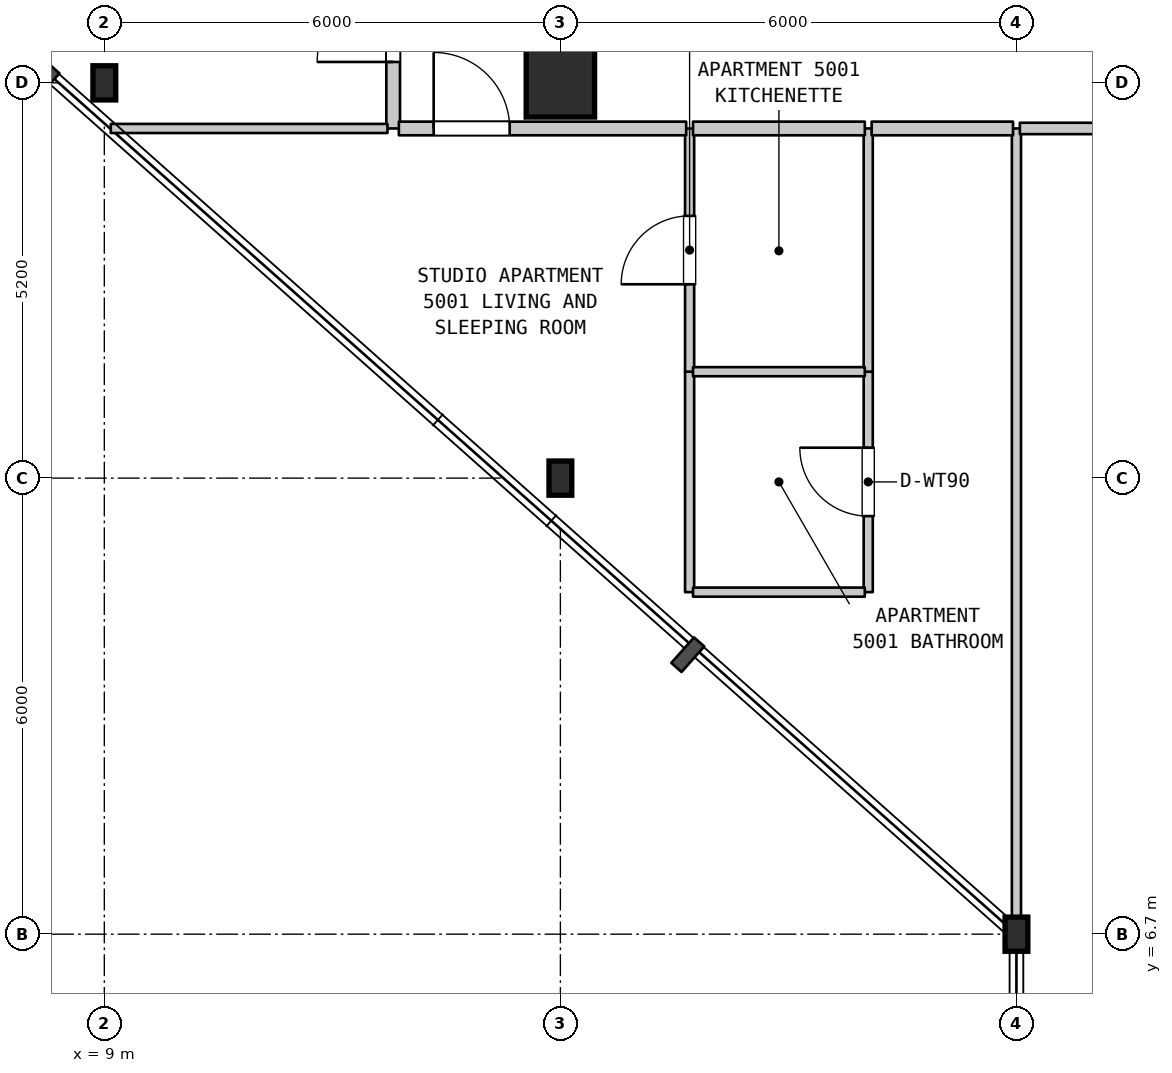
"""IFC4 building model, lengths in metres.
Left out: names, types, materials, properties, quantities, classifications, styles, units other than length and angle.
Written with IfcOpenShell. Run it as: python <this file> out.ifc"""

import sys

from ifc_helpers import new_model, si_unit, direction, frame, frame_2d, origin, origin_2d, place, context, subcontext, project, spatial, rectangle, i_section, extrude, element, fill, save


model = new_model("IFC4")
c1 = context("Model", 3, precision=1e-05, world=origin(), true_north=direction((0.0, 1.0)))
c2 = subcontext(c1, "Body", "Model", "MODEL_VIEW")
j1 = project(units=[si_unit("LENGTHUNIT", "METRE"), si_unit("PLANEANGLEUNIT", "RADIAN")], contexts=[c1])
p1 = place(None, origin())
s1 = spatial("IfcSite", under=j1, at=p1, CompositionType="ELEMENT")
p2 = place(p1, origin())
s2 = spatial("IfcBuilding", under=s1, at=p2, CompositionType="ELEMENT")
p3 = place(p2, frame((0.0, 0.0, 203.2)))
s3 = spatial("IfcBuildingStorey", under=s2, at=p3, CompositionType="ELEMENT", Elevation=203.2)
for number, where, z_axis, x_axis in (
    (1, (9.0, 17.9, 0.0), (0.0, 0.0, 1.0), (1.0, 0.0, 0.0)),
    (2, (15.0, 12.7, 0.0), (0.0, 0.0, 1.0), (1.0, 0.0, 0.0)),
):
    element("IfcColumn", number, at=place(p3, frame(where, z_axis=z_axis, x_axis=x_axis)), inside=s3, PredefinedType="COLUMN", context=c2, shape_type="SweptSolid", body=[
        extrude(i_section(OverallWidth=0.3, OverallDepth=0.45, WebThickness=0.014, FlangeThickness=0.026, FilletRadius=0.027, at=origin_2d()), origin(), (0.0, 0.0, 1.0), 3.7),
    ])
p4 = place(p3, frame((15.0, 17.9, 0.0), z_axis=(0.0, 0.0, 1.0), x_axis=(1.0, 0.0, 0.0)))
e3 = element("IfcColumn", 3, at=p4, inside=s3, PredefinedType="COLUMN", context=c2, shape_type="SweptSolid", body=[
    extrude(rectangle(XDim=0.9, YDim=0.9, at=origin_2d()), origin(), (0.0, 0.0, 1.0), 3.7),
])
p5 = place(p3, frame((21.0, 6.7, 0.0), z_axis=(0.0, 0.0, 1.0), x_axis=(1.0, 0.0, 0.0)))
e4 = element("IfcColumn", 4, at=p5, inside=s3, PredefinedType="COLUMN", context=c2, shape_type="SweptSolid", body=[
    extrude(i_section(OverallWidth=0.3, OverallDepth=0.45, WebThickness=0.014, FlangeThickness=0.026, FilletRadius=0.027, at=origin_2d()), origin(), (0.0, 0.0, 1.0), 3.7),
])
p6 = place(p3, frame((12.8, 17.3, 0.0), z_axis=(0.0, 0.0, 1.0), x_axis=(0.0, 1.0, 0.0)))
e5 = element("IfcWall", 5, at=p6, inside=s3, PredefinedType="STANDARD", context=c2, shape_type="SweptSolid", body=[
    extrude(rectangle(XDim=2.75, YDim=0.18, at=frame_2d((1.375, 0.0))), origin(), (0.0, 0.0, 1.0), 3.39),
])
p7 = place(p6, frame((0.875, 0.0, 0.0)))
e6 = element("IfcOpeningElement", 6, at=p7, cuts=e5, PredefinedType="OPENING", context=c2, shape_type="SweptSolid", body=[
    extrude(rectangle(XDim=1.0, YDim=2.15, at=frame_2d((0.5, 1.075))), frame((0.0, 0.1, 0.0), z_axis=(0.0, -1.0, 0.0), x_axis=(1.0, 0.0, 0.0)), (0.0, 0.0, 1.0), 0.2),
])
p8 = place(p3, frame((16.7, 11.2, 0.0), z_axis=(0.0, 0.0, 1.0), x_axis=(0.0, 1.0, 0.0)))
e7 = element("IfcWall", 7, at=p8, inside=s3, PredefinedType="PARTITIONING", context=c2, shape_type="SweptSolid", body=[
    extrude(rectangle(XDim=2.9, YDim=0.12, at=frame_2d((1.45, 0.0))), origin(), (0.0, 0.0, 1.0), 3.39),
])
p9 = place(p3, frame((16.7, 14.1, 0.0), z_axis=(0.0, 0.0, 1.0), x_axis=(0.0, 1.0, 0.0)))
e8 = element("IfcWall", 8, at=p9, inside=s3, PredefinedType="PARTITIONING", context=c2, shape_type="SweptSolid", body=[
    extrude(rectangle(XDim=3.2, YDim=0.12, at=frame_2d((1.6, 0.0))), origin(), (0.0, 0.0, 1.0), 3.39),
])
p10 = place(p9, frame((1.15, 0.0, 0.0)))
e9 = element("IfcOpeningElement", 9, at=p10, cuts=e8, PredefinedType="OPENING", context=c2, shape_type="SweptSolid", body=[
    extrude(rectangle(XDim=0.9, YDim=2.15, at=frame_2d((0.45, 1.075))), frame((0.0, 0.07, 0.0), z_axis=(0.0, -1.0, 0.0), x_axis=(1.0, 0.0, 0.0)), (0.0, 0.0, 1.0), 0.14),
])
p11 = place(p3, frame((19.05, 11.2, 0.0), z_axis=(0.0, 0.0, 1.0), x_axis=(0.0, 1.0, 0.0)))
e10 = element("IfcWall", 10, at=p11, inside=s3, PredefinedType="PARTITIONING", context=c2, shape_type="SweptSolid", body=[
    extrude(rectangle(XDim=2.9, YDim=0.12, at=frame_2d((1.45, 0.0))), origin(), (0.0, 0.0, 1.0), 3.39),
])
p12 = place(p11, frame((1.0, 0.0, 0.0)))
e11 = element("IfcOpeningElement", 11, at=p12, cuts=e10, PredefinedType="OPENING", context=c2, shape_type="SweptSolid", body=[
    extrude(rectangle(XDim=0.9, YDim=2.1, at=frame_2d((0.45, 1.05))), frame((0.0, 0.07, 0.0), z_axis=(0.0, -1.0, 0.0), x_axis=(1.0, 0.0, 0.0)), (0.0, 0.0, 1.0), 0.14),
])
p13 = place(p3, frame((19.05, 14.1, 0.0), z_axis=(0.0, 0.0, 1.0), x_axis=(0.0, 1.0, 0.0)))
e12 = element("IfcWall", 12, at=p13, inside=s3, PredefinedType="PARTITIONING", context=c2, shape_type="SweptSolid", body=[
    extrude(rectangle(XDim=3.2, YDim=0.12, at=frame_2d((1.6, 0.0))), origin(), (0.0, 0.0, 1.0), 3.39),
])
p14 = place(p3, frame((21.0, 6.71, 0.0), z_axis=(0.0, 0.0, 1.0), x_axis=(0.0, 1.0, 0.0)))
e13 = element("IfcWall", 13, at=p14, inside=s3, PredefinedType="PARTITIONING", context=c2, shape_type="SweptSolid", body=[
    extrude(rectangle(XDim=10.59, YDim=0.12, at=frame_2d((5.295, 0.0))), origin(), (0.0, 0.0, 1.0), 3.39),
])
for number, where, z_axis, x_axis in (
    (14, (16.745, 11.2, 0.0), (0.0, 0.0, 1.0), (1.0, 0.0, 0.0)),
    (15, (16.745, 14.1, 0.0), (0.0, 0.0, 1.0), (1.0, 0.0, 0.0)),
):
    element("IfcWall", number, at=place(p3, frame(where, z_axis=z_axis, x_axis=x_axis)), inside=s3, PredefinedType="PARTITIONING", context=c2, shape_type="SweptSolid", body=[
        extrude(rectangle(XDim=2.26, YDim=0.12, at=frame_2d((1.13, 0.0))), origin(), (0.0, 0.0, 1.0), 3.39),
    ])
p15 = place(p3, frame((9.085, 17.3, 0.0), z_axis=(0.0, 0.0, 1.0), x_axis=(1.0, 0.0, 0.0)))
e16 = element("IfcWall", 16, at=p15, inside=s3, PredefinedType="PARTITIONING", context=c2, shape_type="SweptSolid", body=[
    extrude(rectangle(XDim=3.64, YDim=0.12, at=frame_2d((1.82, 0.0))), origin(), (0.0, 0.0, 1.0), 3.39),
])
p16 = place(p3, frame((12.875, 17.3, 0.0), z_axis=(0.0, 0.0, 1.0), x_axis=(1.0, 0.0, 0.0)))
e17 = element("IfcWall", 17, at=p16, inside=s3, PredefinedType="STANDARD", context=c2, shape_type="SweptSolid", body=[
    extrude(rectangle(XDim=3.78, YDim=0.18, at=frame_2d((1.89, 0.0))), origin(), (0.0, 0.0, 1.0), 3.39),
])
p17 = place(p16, frame((0.458, 0.0, 0.0)))
e18 = element("IfcOpeningElement", 18, at=p17, cuts=e17, PredefinedType="OPENING", context=c2, shape_type="SweptSolid", body=[
    extrude(rectangle(XDim=1.0, YDim=2.15, at=frame_2d((0.5, 1.075))), frame((0.0, 0.1, 0.0), z_axis=(0.0, -1.0, 0.0), x_axis=(1.0, 0.0, 0.0)), (0.0, 0.0, 1.0), 0.2),
])
p18 = place(p3, frame((16.745, 17.3, 0.0), z_axis=(0.0, 0.0, 1.0), x_axis=(1.0, 0.0, 0.0)))
e19 = element("IfcWall", 19, at=p18, inside=s3, PredefinedType="STANDARD", context=c2, shape_type="SweptSolid", body=[
    extrude(rectangle(XDim=2.26, YDim=0.18, at=frame_2d((1.13, 0.0))), origin(), (0.0, 0.0, 1.0), 3.39),
])
p19 = place(p3, frame((19.095, 17.3, 0.0), z_axis=(0.0, 0.0, 1.0), x_axis=(1.0, 0.0, 0.0)))
e20 = element("IfcWall", 20, at=p19, inside=s3, PredefinedType="STANDARD", context=c2, shape_type="SweptSolid", body=[
    extrude(rectangle(XDim=1.86, YDim=0.18, at=frame_2d((0.93, 0.0))), origin(), (0.0, 0.0, 1.0), 3.39),
])
p20 = place(p3, frame((21.045, 17.3, 0.0), z_axis=(0.0, 0.0, 1.0), x_axis=(1.0, 0.0, 0.0)))
e21 = element("IfcWall", 21, at=p20, inside=s3, PredefinedType="STANDARD", context=c2, shape_type="SweptSolid", body=[
    extrude(rectangle(XDim=6.51, YDim=0.15, at=frame_2d((3.255, 0.0))), origin(), (0.0, 0.0, 1.0), 3.39),
])
p21 = place(p20, frame((2.755, 0.0, 0.0)))
e22 = element("IfcOpeningElement", 22, at=p21, cuts=e21, PredefinedType="OPENING", context=c2, shape_type="SweptSolid", body=[
    extrude(rectangle(XDim=1.0, YDim=2.15, at=frame_2d((0.5, 1.075))), frame((0.0, 0.085, 0.0), z_axis=(0.0, -1.0, 0.0), x_axis=(1.0, 0.0, 0.0)), (0.0, 0.0, 1.0), 0.17),
])
p22 = place(p7, origin())
e23 = element("IfcDoor", 23, at=p22, inside=s3, OperationType="SINGLE_SWING_LEFT", PredefinedType="DOOR", context=c2, shape_type="SweptSolid", body=[
    extrude(rectangle(XDim=1.0, YDim=2.15, at=frame_2d((0.5, 1.075))), frame((0.0, 0.025, 0.0), z_axis=(0.0, -1.0, 0.0), x_axis=(1.0, 0.0, 0.0)), (0.0, 0.0, 1.0), 0.05),
])
fill(e6, e23)
p23 = place(p10, origin())
e24 = element("IfcDoor", 24, at=p23, inside=s3, OperationType="SINGLE_SWING_LEFT", PredefinedType="DOOR", context=c2, shape_type="SweptSolid", body=[
    extrude(rectangle(XDim=0.9, YDim=2.15, at=frame_2d((0.45, 1.075))), frame((0.0, 0.025, 0.0), z_axis=(0.0, -1.0, 0.0), x_axis=(1.0, 0.0, 0.0)), (0.0, 0.0, 1.0), 0.05),
])
fill(e9, e24)
p24 = place(p12, origin())
e25 = element("IfcDoor", 25, at=p24, inside=s3, OperationType="SINGLE_SWING_RIGHT", PredefinedType="DOOR", context=c2, shape_type="SweptSolid", body=[
    extrude(rectangle(XDim=0.9, YDim=2.1, at=frame_2d((0.45, 1.05))), frame((0.0, 0.025, 0.0), z_axis=(0.0, -1.0, 0.0), x_axis=(1.0, 0.0, 0.0)), (0.0, 0.0, 1.0), 0.05),
])
fill(e11, e25)
p25 = place(p17, origin())
e26 = element("IfcDoor", 26, at=p25, inside=s3, OperationType="SINGLE_SWING_LEFT", PredefinedType="DOOR", context=c2, shape_type="SweptSolid", body=[
    extrude(rectangle(XDim=1.0, YDim=2.15, at=frame_2d((0.5, 1.075))), frame((0.0, 0.025, 0.0), z_axis=(0.0, -1.0, 0.0), x_axis=(1.0, 0.0, 0.0)), (0.0, 0.0, 1.0), 0.05),
])
fill(e18, e26)
save(model, sys.argv[1])
